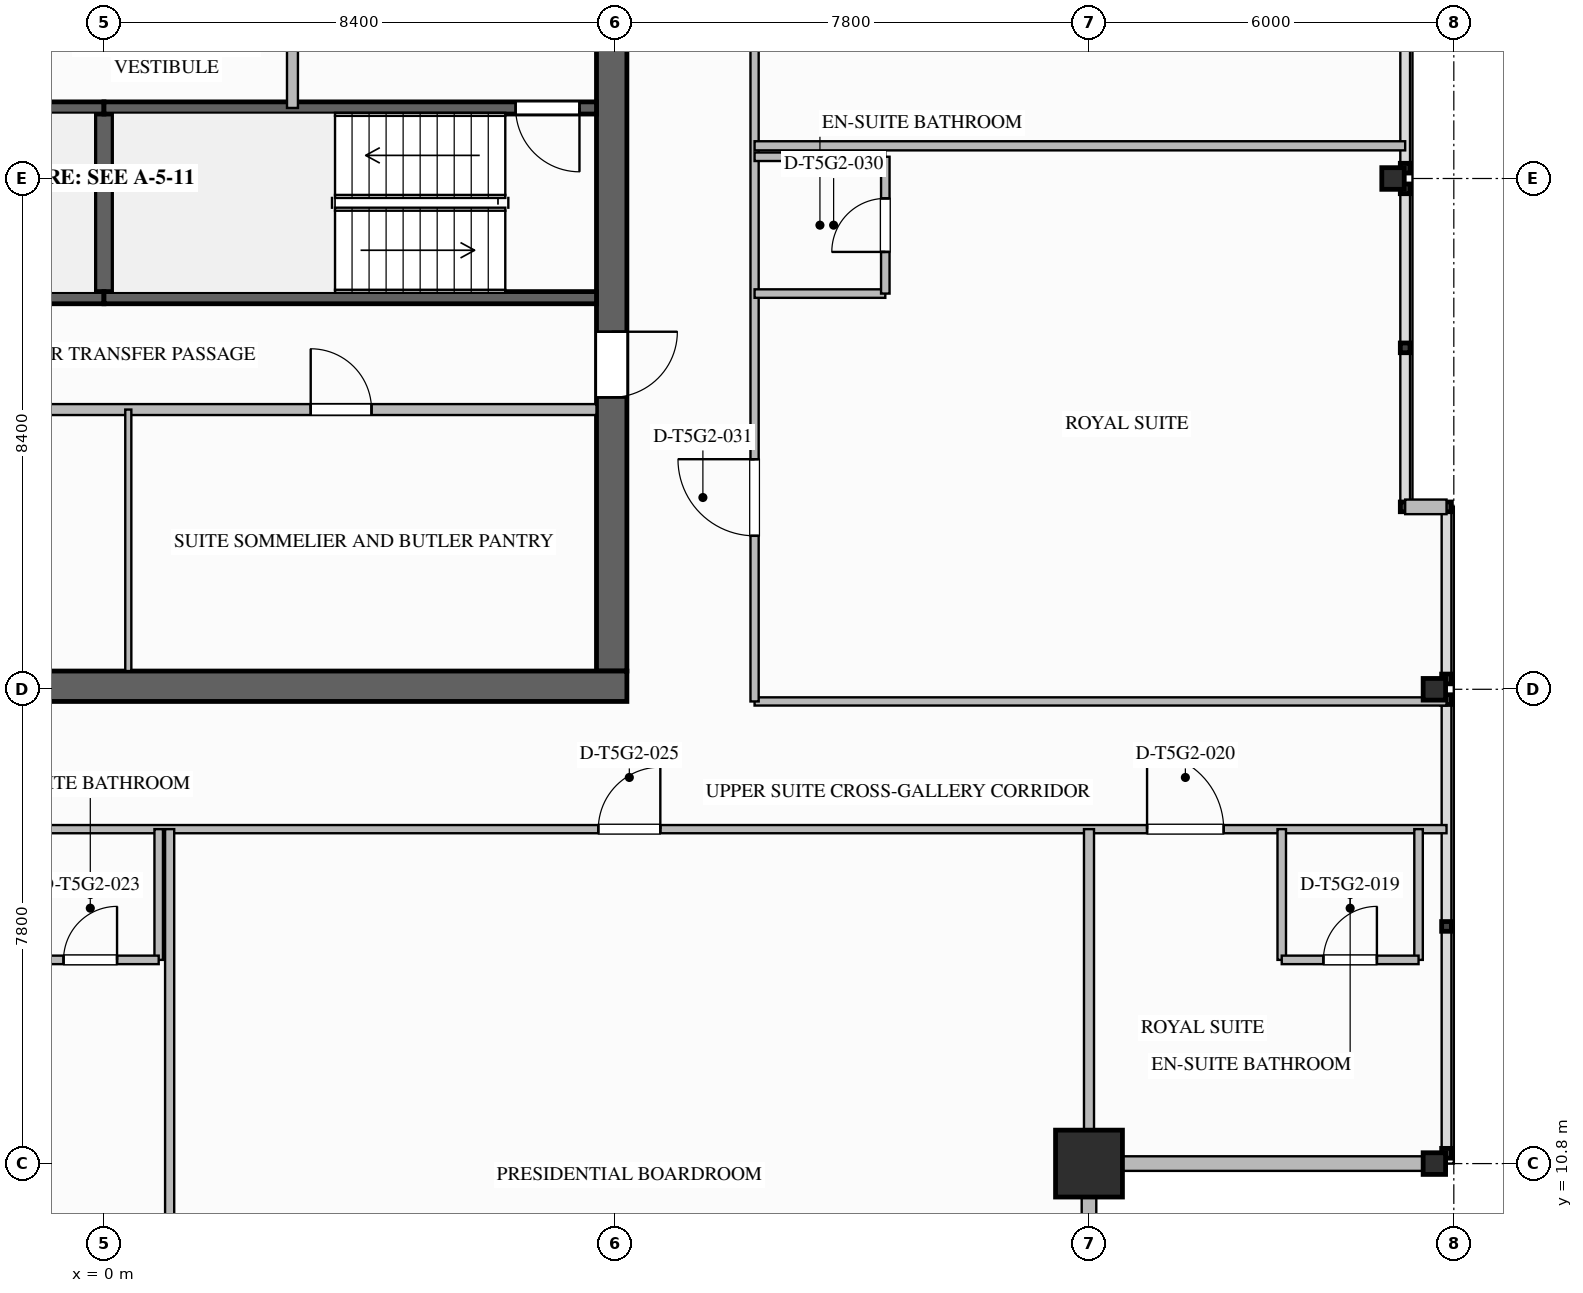
"""IFC4 building model, lengths in metres.
Left out: names, types, materials, properties, quantities, classifications, styles, units other than length and angle.
Written with IfcOpenShell. Run it as: python <this file> out.ifc"""

import sys

from ifc_helpers import new_model, si_unit, direction, frame, frame_2d, origin, origin_2d, place, context, subcontext, project, spatial, rectangle, i_section, extrude, element, fill, save


model = new_model("IFC4")
c1 = context("Model", 3, precision=1e-05, world=origin(), true_north=direction((0.0, 1.0)))
c2 = subcontext(c1, "Body", "Model", "MODEL_VIEW")
j1 = project(units=[si_unit("LENGTHUNIT", "METRE"), si_unit("PLANEANGLEUNIT", "RADIAN")], contexts=[c1])
p1 = place(None, origin())
s1 = spatial("IfcSite", under=j1, at=p1, CompositionType="ELEMENT")
p2 = place(p1, origin())
s2 = spatial("IfcBuilding", under=s1, at=p2, CompositionType="ELEMENT")
p3 = place(p2, frame((0.0, 0.0, 275.95)))
s3 = spatial("IfcBuildingStorey", under=s2, at=p3, CompositionType="ELEMENT", Elevation=275.95)
p4 = place(p3, frame((8.35, 35.1, 0.0), z_axis=(0.0, 0.0, 1.0), x_axis=(0.0, -1.0, 0.0)))
e1 = element("IfcWall", 1, at=p4, inside=s3, PredefinedType="SHEAR", context=c2, shape_type="SweptSolid", body=[
    extrude(rectangle(XDim=16.2, YDim=0.5, at=frame_2d((8.1, 0.0))), origin(), (0.0, 0.0, 1.0), 3.65),
])
p5 = place(p4, frame((3.08, 0.0, 0.0)))
e2 = element("IfcOpeningElement", 2, at=p5, cuts=e1, PredefinedType="OPENING", context=c2, shape_type="SweptSolid", body=[
    extrude(rectangle(XDim=1.12, YDim=2.1, at=frame_2d((0.56, 1.05))), frame((0.0, 0.26, 0.0), z_axis=(0.0, -1.0, 0.0), x_axis=(1.0, 0.0, 0.0)), (0.0, 0.0, 1.0), 0.52),
])
p6 = place(p4, frame((10.62, 0.0, 0.0)))
e3 = element("IfcOpeningElement", 3, at=p6, cuts=e1, PredefinedType="OPENING", context=c2, shape_type="SweptSolid", body=[
    extrude(rectangle(XDim=1.08, YDim=2.04, at=frame_2d((0.54, 1.02))), frame((0.0, 0.26, 0.0), z_axis=(0.0, -1.0, 0.0), x_axis=(1.0, 0.0, 0.0)), (0.0, 0.0, 1.0), 0.52),
])
p7 = place(p3, frame((8.6, 18.65, 0.0), z_axis=(0.0, 0.0, 1.0), x_axis=(-1.0, 0.0, 0.0)))
e4 = element("IfcWall", 4, at=p7, inside=s3, PredefinedType="SHEAR", context=c2, shape_type="SweptSolid", body=[
    extrude(rectangle(XDim=17.2, YDim=0.5, at=frame_2d((8.6, 0.0))), origin(), (0.0, 0.0, 1.0), 3.65),
])
p8 = place(p3, frame((16.2, 10.8, 0.0), z_axis=(0.0, 0.0, 1.0), x_axis=(1.0, 0.0, 0.0)))
e5 = element("IfcColumn", 5, at=p8, inside=s3, PredefinedType="COLUMN", context=c2, shape_type="SweptSolid", body=[
    extrude(rectangle(XDim=1.1, YDim=1.1, at=origin_2d()), origin(), (0.0, 0.0, 1.0), 3.65),
])
for number, where, z_axis, x_axis in (
    (6, (21.88, 10.8, 0.0), (0.0, 0.0, 1.0), (1.0, 0.0, 0.0)),
    (7, (21.88, 18.6, 0.0), (0.0, 0.0, 1.0), (1.0, 0.0, 0.0)),
    (8, (21.2, 27.0, 0.0), (0.0, 0.0, 1.0), (1.0, 0.0, 0.0)),
):
    element("IfcColumn", number, at=place(p3, frame(where, z_axis=z_axis, x_axis=x_axis)), inside=s3, PredefinedType="COLUMN", context=c2, shape_type="SweptSolid", body=[
        extrude(i_section(OverallWidth=0.369, OverallDepth=0.356, WebThickness=0.011, FlangeThickness=0.018, FilletRadius=0.025, at=origin_2d()), origin(), (0.0, 0.0, 1.0), 3.647),
    ])
for number, where, z_axis, x_axis in (
    (9, (22.08, 10.8, 0.0), (0.0, 0.0, 1.0), (-1.0, 0.0, 0.0)),
    (10, (16.2, 10.8, 0.0), (0.0, 0.0, 1.0), (0.0, -1.0, 0.0)),
):
    element("IfcWall", number, at=place(p3, frame(where, z_axis=z_axis, x_axis=x_axis)), inside=s3, PredefinedType="STANDARD", context=c2, shape_type="SweptSolid", body=[
        extrude(rectangle(XDim=5.88, YDim=0.24, at=frame_2d((2.94, 0.0))), origin(), (0.0, 0.0, 1.0), 2.779),
    ])
p9 = place(p3, frame((21.4, 21.6, 0.0), z_axis=(0.0, 0.0, 1.0), x_axis=(1.0, 0.0, 0.0)))
e11 = element("IfcWall", 11, at=p9, inside=s3, PredefinedType="STANDARD", context=c2, shape_type="SweptSolid", body=[
    extrude(rectangle(XDim=0.68, YDim=0.24, at=frame_2d((0.34, 0.0))), origin(), (0.0, 0.0, 1.0), 3.39),
])
p10 = place(p3, frame((0.0, 25.04, 0.0), z_axis=(0.0, 0.0, 1.0), x_axis=(0.0, 1.0, 0.0)))
e12 = element("IfcWall", 12, at=p10, inside=s3, PredefinedType="SOLIDWALL", context=c2, shape_type="SweptSolid", body=[
    extrude(rectangle(XDim=3.12, YDim=0.3, at=frame_2d((1.56, 0.0))), origin(), (0.0, 0.0, 1.0), 3.39),
])
p11 = place(p3, frame((-8.1, 25.04, 0.0), z_axis=(0.0, 0.0, 1.0), x_axis=(1.0, 0.0, 0.0)))
e13 = element("IfcWall", 13, at=p11, inside=s3, PredefinedType="SOLIDWALL", context=c2, shape_type="SweptSolid", body=[
    extrude(rectangle(XDim=8.1, YDim=0.2, at=frame_2d((4.05, 0.0))), origin(), (0.0, 0.0, 1.0), 3.39),
])
p12 = place(p11, frame((0.28, 0.0, 0.0)))
e14 = element("IfcOpeningElement", 14, at=p12, cuts=e13, PredefinedType="OPENING", context=c2, shape_type="SweptSolid", body=[
    extrude(rectangle(XDim=1.05, YDim=2.1, at=frame_2d((0.525, 1.05))), frame((0.0, 0.11, 0.0), z_axis=(0.0, -1.0, 0.0), x_axis=(1.0, 0.0, 0.0)), (0.0, 0.0, 1.0), 0.22),
])
for number, where, z_axis, x_axis in (
    (15, (-8.1, 28.16, 0.0), (0.0, 0.0, 1.0), (1.0, 0.0, 0.0)),
    (16, (0.0, 25.04, 0.0), (0.0, 0.0, 1.0), (1.0, 0.0, 0.0)),
):
    element("IfcWall", number, at=place(p3, frame(where, z_axis=z_axis, x_axis=x_axis)), inside=s3, PredefinedType="SOLIDWALL", context=c2, shape_type="SweptSolid", body=[
        extrude(rectangle(XDim=8.1, YDim=0.2, at=frame_2d((4.05, 0.0))), origin(), (0.0, 0.0, 1.0), 3.39),
    ])
p13 = place(p3, frame((8.1, 28.16, 0.0), z_axis=(0.0, 0.0, 1.0), x_axis=(-1.0, 0.0, 0.0)))
e17 = element("IfcWall", 17, at=p13, inside=s3, PredefinedType="SOLIDWALL", context=c2, shape_type="SweptSolid", body=[
    extrude(rectangle(XDim=8.1, YDim=0.2, at=frame_2d((4.05, 0.0))), origin(), (0.0, 0.0, 1.0), 3.39),
])
p14 = place(p13, frame((0.28, 0.0, 0.0)))
e18 = element("IfcOpeningElement", 18, at=p14, cuts=e17, PredefinedType="OPENING", context=c2, shape_type="SweptSolid", body=[
    extrude(rectangle(XDim=1.05, YDim=2.1, at=frame_2d((0.525, 1.05))), frame((0.0, 0.11, 0.0), z_axis=(0.0, -1.0, 0.0), x_axis=(1.0, 0.0, 0.0)), (0.0, 0.0, 1.0), 0.22),
])
p15 = place(p3, frame((3.1, 28.16, 0.0), z_axis=(0.0, 0.0, 1.0), x_axis=(0.0, 1.0, 0.0)))
e19 = element("IfcWall", 19, at=p15, inside=s3, PredefinedType="SOLIDWALL", context=c2, shape_type="SweptSolid", body=[
    extrude(rectangle(XDim=4.06, YDim=0.18, at=frame_2d((2.03, 0.0))), origin(), (0.0, 0.0, 1.0), 3.39),
])
p16 = place(p15, frame((1.4, 0.0, 0.0)))
e20 = element("IfcOpeningElement", 20, at=p16, cuts=e19, PredefinedType="OPENING", context=c2, shape_type="SweptSolid", body=[
    extrude(rectangle(XDim=1.12, YDim=2.1, at=frame_2d((0.56, 1.05))), frame((0.0, 0.1, 0.0), z_axis=(0.0, -1.0, 0.0), x_axis=(1.0, 0.0, 0.0)), (0.0, 0.0, 1.0), 0.2),
])
p17 = place(p3, frame((-8.1, 23.2, 0.0), z_axis=(0.0, 0.0, 1.0), x_axis=(1.0, 0.0, 0.0)))
e21 = element("IfcWall", 21, at=p17, inside=s3, PredefinedType="SOLIDWALL", context=c2, shape_type="SweptSolid", body=[
    extrude(rectangle(XDim=16.2, YDim=0.18, at=frame_2d((8.1, 0.0))), origin(), (0.0, 0.0, 1.0), 3.39),
])
p18 = place(p17, frame((2.8, 0.0, 0.0)))
e22 = element("IfcOpeningElement", 22, at=p18, cuts=e21, PredefinedType="OPENING", context=c2, shape_type="SweptSolid", body=[
    extrude(rectangle(XDim=1.0, YDim=2.1, at=frame_2d((0.5, 1.05))), frame((0.0, 0.1, 0.0), z_axis=(0.0, -1.0, 0.0), x_axis=(1.0, 0.0, 0.0)), (0.0, 0.0, 1.0), 0.2),
])
p19 = place(p17, frame((11.5, 0.0, 0.0)))
e23 = element("IfcOpeningElement", 23, at=p19, cuts=e21, PredefinedType="OPENING", context=c2, shape_type="SweptSolid", body=[
    extrude(rectangle(XDim=1.0, YDim=2.1, at=frame_2d((0.5, 1.05))), frame((0.0, 0.1, 0.0), z_axis=(0.0, -1.0, 0.0), x_axis=(1.0, 0.0, 0.0)), (0.0, 0.0, 1.0), 0.2),
])
p20 = place(p3, frame((0.4, 18.9, 0.0), z_axis=(0.0, 0.0, 1.0), x_axis=(0.0, 1.0, 0.0)))
e24 = element("IfcWall", 24, at=p20, inside=s3, PredefinedType="PARTITIONING", context=c2, shape_type="SweptSolid", body=[
    extrude(rectangle(XDim=4.3, YDim=0.1, at=frame_2d((2.15, 0.0))), origin(), (0.0, 0.0, 1.0), 3.39),
])
p21 = place(p3, frame((-16.2, 16.3, 0.0), z_axis=(0.0, 0.0, 1.0), x_axis=(1.0, 0.0, 0.0)))
e25 = element("IfcWall", 25, at=p21, inside=s3, PredefinedType="PARTITIONING", context=c2, shape_type="SweptSolid", body=[
    extrude(rectangle(XDim=38.28, YDim=0.135, at=frame_2d((19.14, 0.0))), origin(), (0.0, 0.0, 1.0), 3.39),
])
p22 = place(p21, frame((33.355, 0.0, 0.0)))
e26 = element("IfcOpeningElement", 26, at=p22, cuts=e25, PredefinedType="OPENING", context=c2, shape_type="SweptSolid", body=[
    extrude(rectangle(XDim=1.26, YDim=2.2, at=frame_2d((0.63, 1.1))), frame((0.0, 0.077, 0.0), z_axis=(0.0, -1.0, 0.0), x_axis=(1.0, 0.0, 0.0)), (0.0, 0.0, 1.0), 0.155),
])
p23 = place(p21, frame((6.795, 0.0, 0.0)))
e27 = element("IfcOpeningElement", 27, at=p23, cuts=e25, PredefinedType="OPENING", context=c2, shape_type="SweptSolid", body=[
    extrude(rectangle(XDim=1.26, YDim=2.2, at=frame_2d((0.63, 1.1))), frame((0.0, 0.077, 0.0), z_axis=(0.0, -1.0, 0.0), x_axis=(1.0, 0.0, 0.0)), (0.0, 0.0, 1.0), 0.155),
])
p24 = place(p21, frame((24.33, 0.0, 0.0)))
e28 = element("IfcOpeningElement", 28, at=p24, cuts=e25, PredefinedType="OPENING", context=c2, shape_type="SweptSolid", body=[
    extrude(rectangle(XDim=1.02, YDim=2.15, at=frame_2d((0.51, 1.075))), frame((0.0, 0.077, 0.0), z_axis=(0.0, -1.0, 0.0), x_axis=(1.0, 0.0, 0.0)), (0.0, 0.0, 1.0), 0.155),
])
p25 = place(p3, frame((10.7, 18.4, 0.0), z_axis=(0.0, 0.0, 1.0), x_axis=(1.0, 0.0, 0.0)))
e29 = element("IfcWall", 29, at=p25, inside=s3, PredefinedType="PARTITIONING", context=c2, shape_type="SweptSolid", body=[
    extrude(rectangle(XDim=11.38, YDim=0.135, at=frame_2d((5.69, 0.0))), origin(), (0.0, 0.0, 1.0), 2.767),
])
p26 = place(p3, frame((10.7, 18.4, 0.0), z_axis=(0.0, 0.0, 1.0), x_axis=(0.0, 1.0, 0.0)))
e30 = element("IfcWall", 30, at=p26, inside=s3, PredefinedType="PARTITIONING", context=c2, shape_type="SweptSolid", body=[
    extrude(rectangle(XDim=17.2, YDim=0.135, at=frame_2d((8.6, 0.0))), origin(), (0.0, 0.0, 1.0), 3.39),
])
p27 = place(p26, frame((2.724, 0.0, 0.0)))
e31 = element("IfcOpeningElement", 31, at=p27, cuts=e30, PredefinedType="OPENING", context=c2, shape_type="SweptSolid", body=[
    extrude(rectangle(XDim=1.26, YDim=2.2, at=frame_2d((0.63, 1.1))), frame((0.0, 0.077, 0.0), z_axis=(0.0, -1.0, 0.0), x_axis=(1.0, 0.0, 0.0)), (0.0, 0.0, 1.0), 0.155),
])
p28 = place(p26, frame((12.659, 0.0, 0.0)))
e32 = element("IfcOpeningElement", 32, at=p28, cuts=e30, PredefinedType="OPENING", context=c2, shape_type="SweptSolid", body=[
    extrude(rectangle(XDim=1.02, YDim=2.15, at=frame_2d((0.51, 1.075))), frame((0.0, 0.077, 0.0), z_axis=(0.0, -1.0, 0.0), x_axis=(1.0, 0.0, 0.0)), (0.0, 0.0, 1.0), 0.155),
])
p29 = place(p3, frame((16.2, 10.92, 0.0), z_axis=(0.0, 0.0, 1.0), x_axis=(0.0, 1.0, 0.0)))
e33 = element("IfcWall", 33, at=p29, inside=s3, PredefinedType="PARTITIONING", context=c2, shape_type="SweptSolid", body=[
    extrude(rectangle(XDim=5.38, YDim=0.165, at=frame_2d((2.69, 0.0))), origin(), (0.0, 0.0, 1.0), 2.764),
])
for number, where, z_axis, x_axis in (
    (34, (19.37, 16.3, 0.0), (0.0, 0.0, 1.0), (0.0, -1.0, 0.0)),
    (35, (21.62, 16.3, 0.0), (0.0, 0.0, 1.0), (0.0, -1.0, 0.0)),
):
    element("IfcWall", number, at=place(p3, frame(where, z_axis=z_axis, x_axis=x_axis)), inside=s3, PredefinedType="PLUMBINGWALL", context=c2, shape_type="SweptSolid", body=[
        extrude(rectangle(XDim=2.15, YDim=0.14, at=frame_2d((1.075, 0.0))), origin(), (0.0, 0.0, 1.0), 3.39),
    ])
p30 = place(p3, frame((19.37, 14.15, 0.0), z_axis=(0.0, 0.0, 1.0), x_axis=(1.0, 0.0, 0.0)))
e36 = element("IfcWall", 36, at=p30, inside=s3, PredefinedType="PLUMBINGWALL", context=c2, shape_type="SweptSolid", body=[
    extrude(rectangle(XDim=2.25, YDim=0.14, at=frame_2d((1.125, 0.0))), origin(), (0.0, 0.0, 1.0), 3.39),
])
p31 = place(p30, frame((0.685, 0.0, 0.0)))
e37 = element("IfcOpeningElement", 37, at=p31, cuts=e36, PredefinedType="OPENING", context=c2, shape_type="SweptSolid", body=[
    extrude(rectangle(XDim=0.88, YDim=2.1, at=frame_2d((0.44, 1.05))), frame((0.0, 0.08, 0.0), z_axis=(0.0, -1.0, 0.0), x_axis=(1.0, 0.0, 0.0)), (0.0, 0.0, 1.0), 0.16),
])
p32 = place(p3, frame((0.9, 16.3, 0.0), z_axis=(0.0, 0.0, 1.0), x_axis=(0.0, -1.0, 0.0)))
e38 = element("IfcWall", 38, at=p32, inside=s3, PredefinedType="PLUMBINGWALL", context=c2, shape_type="SweptSolid", body=[
    extrude(rectangle(XDim=2.15, YDim=0.14, at=frame_2d((1.075, 0.0))), origin(), (0.0, 0.0, 1.0), 3.39),
])
p33 = place(p3, frame((-1.35, 14.15, 0.0), z_axis=(0.0, 0.0, 1.0), x_axis=(1.0, 0.0, 0.0)))
e39 = element("IfcWall", 39, at=p33, inside=s3, PredefinedType="PLUMBINGWALL", context=c2, shape_type="SweptSolid", body=[
    extrude(rectangle(XDim=2.25, YDim=0.14, at=frame_2d((1.125, 0.0))), origin(), (0.0, 0.0, 1.0), 3.39),
])
p34 = place(p33, frame((0.685, 0.0, 0.0)))
e40 = element("IfcOpeningElement", 40, at=p34, cuts=e39, PredefinedType="OPENING", context=c2, shape_type="SweptSolid", body=[
    extrude(rectangle(XDim=0.88, YDim=2.1, at=frame_2d((0.44, 1.05))), frame((0.0, 0.08, 0.0), z_axis=(0.0, -1.0, 0.0), x_axis=(1.0, 0.0, 0.0)), (0.0, 0.0, 1.0), 0.16),
])
p35 = place(p3, frame((1.08, 5.6, 0.0), z_axis=(0.0, 0.0, 1.0), x_axis=(0.0, 1.0, 0.0)))
e41 = element("IfcWall", 41, at=p35, inside=s3, PredefinedType="PARTITIONING", context=c2, shape_type="SweptSolid", body=[
    extrude(rectangle(XDim=10.7, YDim=0.15, at=frame_2d((5.35, 0.0))), origin(), (0.0, 0.0, 1.0), 3.39),
])
for number, where, z_axis, x_axis in (
    (42, (10.7, 25.107, 0.0), (0.0, 0.0, 1.0), (1.0, 0.0, 0.0)),
    (43, (10.7, 27.357, 0.0), (0.0, 0.0, 1.0), (1.0, 0.0, 0.0)),
):
    element("IfcWall", number, at=place(p3, frame(where, z_axis=z_axis, x_axis=x_axis)), inside=s3, PredefinedType="PLUMBINGWALL", context=c2, shape_type="SweptSolid", body=[
        extrude(rectangle(XDim=2.15, YDim=0.14, at=frame_2d((1.075, 0.0))), origin(), (0.0, 0.0, 1.0), 3.39),
    ])
p36 = place(p3, frame((12.85, 25.107, 0.0), z_axis=(0.0, 0.0, 1.0), x_axis=(0.0, 1.0, 0.0)))
e44 = element("IfcWall", 44, at=p36, inside=s3, PredefinedType="PLUMBINGWALL", context=c2, shape_type="SweptSolid", body=[
    extrude(rectangle(XDim=2.25, YDim=0.14, at=frame_2d((1.125, 0.0))), origin(), (0.0, 0.0, 1.0), 3.39),
])
p37 = place(p36, frame((0.685, 0.0, 0.0)))
e45 = element("IfcOpeningElement", 45, at=p37, cuts=e44, PredefinedType="OPENING", context=c2, shape_type="SweptSolid", body=[
    extrude(rectangle(XDim=0.88, YDim=2.1, at=frame_2d((0.44, 1.05))), frame((0.0, 0.08, 0.0), z_axis=(0.0, -1.0, 0.0), x_axis=(1.0, 0.0, 0.0)), (0.0, 0.0, 1.0), 0.16),
])
p38 = place(p3, frame((10.7, 27.538, 0.0), z_axis=(0.0, 0.0, 1.0), x_axis=(1.0, 0.0, 0.0)))
e46 = element("IfcWall", 46, at=p38, inside=s3, PredefinedType="PARTITIONING", context=c2, shape_type="SweptSolid", body=[
    extrude(rectangle(XDim=10.7, YDim=0.15, at=frame_2d((5.35, 0.0))), origin(), (0.0, 0.0, 1.0), 3.39),
])
p39 = place(p14, origin())
e47 = element("IfcDoor", 47, at=p39, inside=s3, OperationType="SINGLE_SWING_LEFT", PredefinedType="DOOR", context=c2, shape_type="SweptSolid", body=[
    extrude(rectangle(XDim=1.05, YDim=2.1, at=frame_2d((0.525, 1.05))), frame((0.0, 0.025, 0.0), z_axis=(0.0, -1.0, 0.0), x_axis=(1.0, 0.0, 0.0)), (0.0, 0.0, 1.0), 0.05),
])
fill(e18, e47)
p40 = place(p6, origin())
e48 = element("IfcDoor", 48, at=p40, inside=s3, OperationType="SINGLE_SWING_LEFT", PredefinedType="DOOR", context=c2, shape_type="SweptSolid", body=[
    extrude(rectangle(XDim=1.08, YDim=2.04, at=frame_2d((0.54, 1.02))), frame((0.0, 0.025, 0.0), z_axis=(0.0, -1.0, 0.0), x_axis=(1.0, 0.0, 0.0)), (0.0, 0.0, 1.0), 0.05),
])
fill(e3, e48)
p41 = place(p19, origin())
e49 = element("IfcDoor", 49, at=p41, inside=s3, OperationType="SINGLE_SWING_LEFT", PredefinedType="DOOR", context=c2, shape_type="SweptSolid", body=[
    extrude(rectangle(XDim=1.0, YDim=2.1, at=frame_2d((0.5, 1.05))), frame((0.0, 0.025, 0.0), z_axis=(0.0, -1.0, 0.0), x_axis=(1.0, 0.0, 0.0)), (0.0, 0.0, 1.0), 0.05),
])
fill(e23, e49)
p42 = place(p31, origin())
e50 = element("IfcDoor", 50, at=p42, inside=s3, OperationType="SINGLE_SWING_RIGHT", PredefinedType="DOOR", context=c2, shape_type="SweptSolid", body=[
    extrude(rectangle(XDim=0.88, YDim=2.1, at=frame_2d((0.44, 1.05))), frame((0.0, 0.025, 0.0), z_axis=(0.0, -1.0, 0.0), x_axis=(1.0, 0.0, 0.0)), (0.0, 0.0, 1.0), 0.05),
])
fill(e37, e50)
p43 = place(p22, origin())
e51 = element("IfcDoor", 51, at=p43, inside=s3, OperationType="SINGLE_SWING_LEFT", PredefinedType="DOOR", context=c2, shape_type="SweptSolid", body=[
    extrude(rectangle(XDim=1.26, YDim=2.2, at=frame_2d((0.63, 1.1))), frame((0.0, 0.025, 0.0), z_axis=(0.0, -1.0, 0.0), x_axis=(1.0, 0.0, 0.0)), (0.0, 0.0, 1.0), 0.05),
])
fill(e26, e51)
p44 = place(p34, origin())
e52 = element("IfcDoor", 52, at=p44, inside=s3, OperationType="SINGLE_SWING_RIGHT", PredefinedType="DOOR", context=c2, shape_type="SweptSolid", body=[
    extrude(rectangle(XDim=0.88, YDim=2.1, at=frame_2d((0.44, 1.05))), frame((0.0, 0.025, 0.0), z_axis=(0.0, -1.0, 0.0), x_axis=(1.0, 0.0, 0.0)), (0.0, 0.0, 1.0), 0.05),
])
fill(e40, e52)
p45 = place(p24, origin())
e53 = element("IfcDoor", 53, at=p45, inside=s3, OperationType="SINGLE_SWING_RIGHT", PredefinedType="DOOR", context=c2, shape_type="SweptSolid", body=[
    extrude(rectangle(XDim=1.02, YDim=2.15, at=frame_2d((0.51, 1.075))), frame((0.0, 0.025, 0.0), z_axis=(0.0, -1.0, 0.0), x_axis=(1.0, 0.0, 0.0)), (0.0, 0.0, 1.0), 0.05),
])
fill(e28, e53)
p46 = place(p37, origin())
e54 = element("IfcDoor", 54, at=p46, inside=s3, OperationType="SINGLE_SWING_LEFT", PredefinedType="DOOR", context=c2, shape_type="SweptSolid", body=[
    extrude(rectangle(XDim=0.88, YDim=2.1, at=frame_2d((0.44, 1.05))), frame((0.0, 0.025, 0.0), z_axis=(0.0, -1.0, 0.0), x_axis=(1.0, 0.0, 0.0)), (0.0, 0.0, 1.0), 0.05),
])
fill(e45, e54)
p47 = place(p27, origin())
e55 = element("IfcDoor", 55, at=p47, inside=s3, OperationType="SINGLE_SWING_RIGHT", PredefinedType="DOOR", context=c2, shape_type="SweptSolid", body=[
    extrude(rectangle(XDim=1.26, YDim=2.2, at=frame_2d((0.63, 1.1))), frame((0.0, 0.025, 0.0), z_axis=(0.0, -1.0, 0.0), x_axis=(1.0, 0.0, 0.0)), (0.0, 0.0, 1.0), 0.05),
])
fill(e31, e55)
save(model, sys.argv[1])
